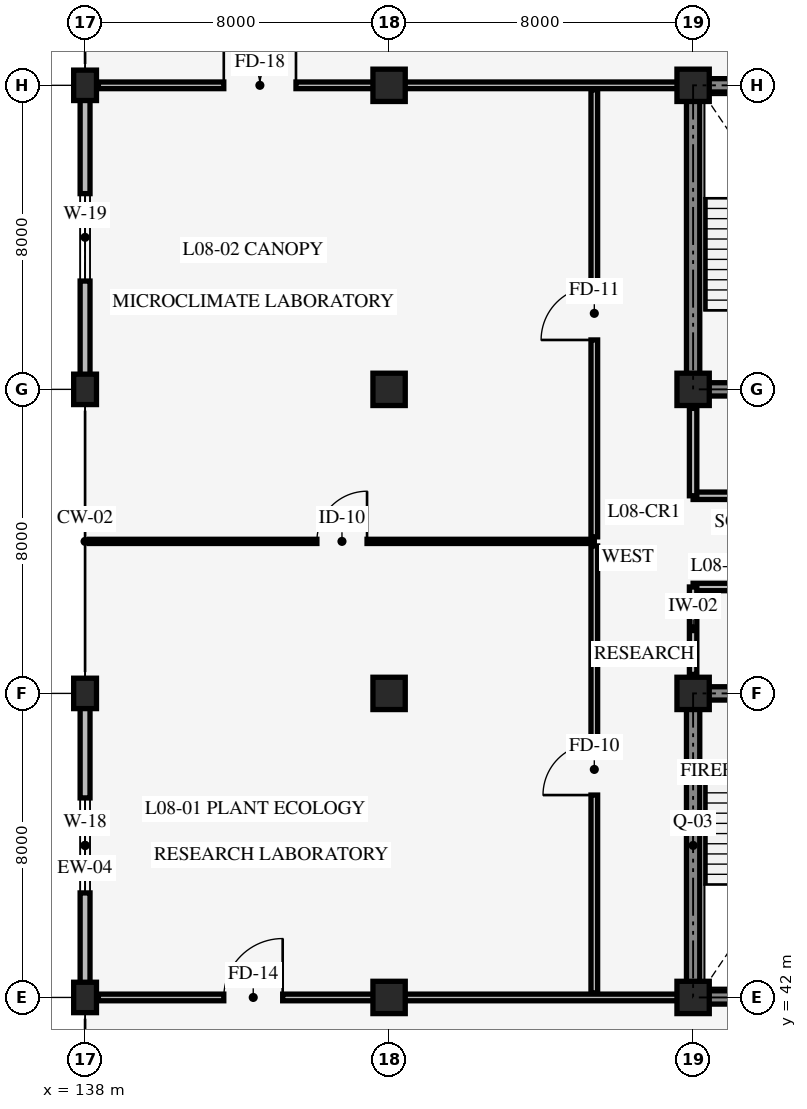
"""IFC4 building model, lengths in metres.
Left out: names, types, materials, properties, quantities, classifications, styles, units other than length and angle.
Written with IfcOpenShell. Run it as: python <this file> out.ifc"""

import sys

from ifc_helpers import new_model, si_unit, direction, frame, frame_2d, origin, origin_2d, place, context, subcontext, project, spatial, rectangle, extrude, element, fill, save


model = new_model("IFC4")
c1 = context("Model", 3, precision=1e-05, world=origin(), true_north=direction((0.0, 1.0)))
c2 = subcontext(c1, "Body", "Model", "MODEL_VIEW")
j1 = project(units=[si_unit("LENGTHUNIT", "METRE"), si_unit("PLANEANGLEUNIT", "RADIAN")], contexts=[c1])
p1 = place(None, origin())
s1 = spatial("IfcSite", under=j1, at=p1, CompositionType="ELEMENT")
p2 = place(p1, origin())
s2 = spatial("IfcBuilding", under=s1, at=p2, CompositionType="ELEMENT")
p3 = place(p2, frame((0.0, 0.0, 31.8)))
s3 = spatial("IfcBuildingStorey", under=s2, at=p3, CompositionType="ELEMENT", Elevation=31.8)
p4 = place(p3, frame((154.0, 42.0, 0.0), z_axis=(0.0, 0.0, 1.0), x_axis=(1.0, 0.0, 0.0)))
e1 = element("IfcWall", 1, at=p4, inside=s3, PredefinedType="SHEAR", context=c2, shape_type="SweptSolid", body=[
    extrude(rectangle(XDim=8.0, YDim=0.35, at=frame_2d((4.0, 0.0))), origin(), (0.0, 0.0, 1.0), 3.95),
])
p5 = place(p3, frame((162.0, 50.0, 0.0), z_axis=(0.0, 0.0, 1.0), x_axis=(-1.0, 0.0, 0.0)))
e2 = element("IfcWall", 2, at=p5, inside=s3, PredefinedType="SHEAR", context=c2, shape_type="SweptSolid", body=[
    extrude(rectangle(XDim=8.0, YDim=0.35, at=frame_2d((4.0, 0.0))), origin(), (0.0, 0.0, 1.0), 3.95),
])
p6 = place(p5, frame((5.3, 0.0, 0.0)))
e3 = element("IfcOpeningElement", 3, at=p6, cuts=e2, PredefinedType="OPENING", context=c2, shape_type="SweptSolid", body=[
    extrude(rectangle(XDim=1.3, YDim=2.15, at=frame_2d((0.65, 1.075))), frame((0.0, 0.185, 0.0), z_axis=(0.0, -1.0, 0.0), x_axis=(1.0, 0.0, 0.0)), (0.0, 0.0, 1.0), 0.37),
])
p7 = place(p5, frame((1.45, 0.0, 0.0)))
e4 = element("IfcOpeningElement", 4, at=p7, cuts=e2, PredefinedType="OPENING", context=c2, shape_type="SweptSolid", body=[
    extrude(rectangle(XDim=1.1, YDim=2.2, at=frame_2d((0.55, 1.1))), frame((0.0, 0.185, 0.0), z_axis=(0.0, -1.0, 0.0), x_axis=(1.0, 0.0, 0.0)), (0.0, 0.0, 1.0), 0.37),
])
p8 = place(p3, frame((154.0, 50.0, 0.0), z_axis=(0.0, 0.0, 1.0), x_axis=(0.0, -1.0, 0.0)))
e5 = element("IfcWall", 5, at=p8, inside=s3, PredefinedType="SHEAR", context=c2, shape_type="SweptSolid", body=[
    extrude(rectangle(XDim=8.0, YDim=0.35, at=frame_2d((4.0, 0.0))), origin(), (0.0, 0.0, 1.0), 3.95),
])
p9 = place(p3, frame((154.0, 58.0, 0.0), z_axis=(0.0, 0.0, 1.0), x_axis=(1.0, 0.0, 0.0)))
e6 = element("IfcWall", 6, at=p9, inside=s3, PredefinedType="SHEAR", context=c2, shape_type="SweptSolid", body=[
    extrude(rectangle(XDim=8.0, YDim=0.35, at=frame_2d((4.0, 0.0))), origin(), (0.0, 0.0, 1.0), 3.95),
])
p10 = place(p9, frame((1.4, 0.0, 0.0)))
e7 = element("IfcOpeningElement", 7, at=p10, cuts=e6, PredefinedType="OPENING", context=c2, shape_type="SweptSolid", body=[
    extrude(rectangle(XDim=1.3, YDim=2.15, at=frame_2d((0.65, 1.075))), frame((0.0, 0.185, 0.0), z_axis=(0.0, -1.0, 0.0), x_axis=(1.0, 0.0, 0.0)), (0.0, 0.0, 1.0), 0.37),
])
p11 = place(p9, frame((5.3, 0.0, 0.0)))
e8 = element("IfcOpeningElement", 8, at=p11, cuts=e6, PredefinedType="OPENING", context=c2, shape_type="SweptSolid", body=[
    extrude(rectangle(XDim=1.1, YDim=2.2, at=frame_2d((0.55, 1.1))), frame((0.0, 0.185, 0.0), z_axis=(0.0, -1.0, 0.0), x_axis=(1.0, 0.0, 0.0)), (0.0, 0.0, 1.0), 0.37),
])
for number, where, z_axis, x_axis in (
    (9, (162.0, 66.0, 0.0), (0.0, 0.0, 1.0), (-1.0, 0.0, 0.0)),
    (10, (154.0, 66.0, 0.0), (0.0, 0.0, 1.0), (0.0, -1.0, 0.0)),
):
    element("IfcWall", number, at=place(p3, frame(where, z_axis=z_axis, x_axis=x_axis)), inside=s3, PredefinedType="SHEAR", context=c2, shape_type="SweptSolid", body=[
        extrude(rectangle(XDim=8.0, YDim=0.35, at=frame_2d((4.0, 0.0))), origin(), (0.0, 0.0, 1.0), 3.95),
    ])
for number, where, z_axis, x_axis in (
    (11, (138.0, 42.0, 0.0), (0.0, 0.0, 1.0), (1.0, 0.0, 0.0)),
    (12, (138.0, 50.0, 0.0), (0.0, 0.0, 1.0), (1.0, 0.0, 0.0)),
    (13, (138.0, 58.0, 0.0), (0.0, 0.0, 1.0), (1.0, 0.0, 0.0)),
    (14, (138.0, 66.0, 0.0), (0.0, 0.0, 1.0), (1.0, 0.0, 0.0)),
):
    element("IfcColumn", number, at=place(p3, frame(where, z_axis=z_axis, x_axis=x_axis)), inside=s3, PredefinedType="COLUMN", context=c2, shape_type="SweptSolid", body=[
        extrude(rectangle(XDim=0.6, YDim=0.8, at=origin_2d()), origin(), (0.0, 0.0, 1.0), 4.2),
    ])
for number, where, z_axis, x_axis in (
    (15, (146.0, 42.0, 0.0), (0.0, 0.0, 1.0), (1.0, 0.0, 0.0)),
    (16, (146.0, 50.0, 0.0), (0.0, 0.0, 1.0), (1.0, 0.0, 0.0)),
    (17, (146.0, 58.0, 0.0), (0.0, 0.0, 1.0), (1.0, 0.0, 0.0)),
    (18, (146.0, 66.0, 0.0), (0.0, 0.0, 1.0), (1.0, 0.0, 0.0)),
    (19, (154.0, 42.0, 0.0), (0.0, 0.0, 1.0), (1.0, 0.0, 0.0)),
    (20, (154.0, 50.0, 0.0), (0.0, 0.0, 1.0), (1.0, 0.0, 0.0)),
    (21, (154.0, 58.0, 0.0), (0.0, 0.0, 1.0), (1.0, 0.0, 0.0)),
    (22, (154.0, 66.0, 0.0), (0.0, 0.0, 1.0), (1.0, 0.0, 0.0)),
):
    element("IfcColumn", number, at=place(p3, frame(where, z_axis=z_axis, x_axis=x_axis)), inside=s3, PredefinedType="COLUMN", context=c2, shape_type="SweptSolid", body=[
        extrude(rectangle(XDim=0.85, YDim=0.85, at=origin_2d()), origin(), (0.0, 0.0, 1.0), 4.2),
    ])
p12 = place(p3, frame((138.0, 42.0, 0.0), z_axis=(0.0, 0.0, 1.0), x_axis=(0.0, 1.0, 0.0)))
e23 = element("IfcWall", 23, at=p12, inside=s3, PredefinedType="STANDARD", context=c2, shape_type="SweptSolid", body=[
    extrude(rectangle(XDim=8.0, YDim=0.26, at=frame_2d((4.0, 0.0))), origin(), (0.0, 0.0, 1.0), 3.31),
])
p13 = place(p12, frame((2.75, 0.0, 0.85)))
e24 = element("IfcOpeningElement", 24, at=p13, cuts=e23, PredefinedType="OPENING", context=c2, shape_type="SweptSolid", body=[
    extrude(rectangle(XDim=2.5, YDim=1.8, at=frame_2d((1.25, 0.9))), frame((0.0, 0.14, 0.0), z_axis=(0.0, -1.0, 0.0), x_axis=(1.0, 0.0, 0.0)), (0.0, 0.0, 1.0), 0.28),
])
p14 = place(p3, frame((138.0, 58.0, 0.0), z_axis=(0.0, 0.0, 1.0), x_axis=(0.0, 1.0, 0.0)))
e25 = element("IfcWall", 25, at=p14, inside=s3, PredefinedType="STANDARD", context=c2, shape_type="SweptSolid", body=[
    extrude(rectangle(XDim=8.0, YDim=0.26, at=frame_2d((4.0, 0.0))), origin(), (0.0, 0.0, 1.0), 3.31),
])
p15 = place(p14, frame((2.85, 0.0, 0.85)))
e26 = element("IfcOpeningElement", 26, at=p15, cuts=e25, PredefinedType="OPENING", context=c2, shape_type="SweptSolid", body=[
    extrude(rectangle(XDim=2.3, YDim=1.5, at=frame_2d((1.15, 0.75))), frame((0.0, 0.14, 0.0), z_axis=(0.0, -1.0, 0.0), x_axis=(1.0, 0.0, 0.0)), (0.0, 0.0, 1.0), 0.28),
])
p16 = place(p3, frame((154.0, 52.8, 0.0), z_axis=(0.0, 0.0, 1.0), x_axis=(1.0, 0.0, 0.0)))
e27 = element("IfcWall", 27, at=p16, inside=s3, PredefinedType="STANDARD", context=c2, shape_type="SweptSolid", body=[
    extrude(rectangle(XDim=7.6, YDim=0.195, at=frame_2d((3.8, 0.0))), origin(), (0.0, 0.0, 1.0), 3.9),
])
p17 = place(p16, frame((2.8, 0.0, 0.0)))
e28 = element("IfcOpeningElement", 28, at=p17, cuts=e27, PredefinedType="OPENING", context=c2, shape_type="SweptSolid", body=[
    extrude(rectangle(XDim=1.3, YDim=2.15, at=frame_2d((0.65, 1.075))), frame((0.0, 0.107, 0.0), z_axis=(0.0, -1.0, 0.0), x_axis=(1.0, 0.0, 0.0)), (0.0, 0.0, 1.0), 0.215),
])
p18 = place(p3, frame((154.0, 50.5, 0.0), z_axis=(0.0, 0.0, 1.0), x_axis=(0.0, 1.0, 0.0)))
e29 = element("IfcWall", 29, at=p18, inside=s3, PredefinedType="STANDARD", context=c2, shape_type="SweptSolid", body=[
    extrude(rectangle(XDim=2.3, YDim=0.195, at=frame_2d((1.15, 0.0))), origin(), (0.0, 0.0, 1.0), 3.31),
])
p19 = place(p3, frame((154.0, 55.2, 0.0), z_axis=(0.0, 0.0, 1.0), x_axis=(1.0, 0.0, 0.0)))
e30 = element("IfcWall", 30, at=p19, inside=s3, PredefinedType="STANDARD", context=c2, shape_type="SweptSolid", body=[
    extrude(rectangle(XDim=7.6, YDim=0.195, at=frame_2d((3.8, 0.0))), origin(), (0.0, 0.0, 1.0), 3.9),
])
p20 = place(p19, frame((2.8, 0.0, 0.0)))
e31 = element("IfcOpeningElement", 31, at=p20, cuts=e30, PredefinedType="OPENING", context=c2, shape_type="SweptSolid", body=[
    extrude(rectangle(XDim=1.4, YDim=2.2, at=frame_2d((0.7, 1.1))), frame((0.0, 0.107, 0.0), z_axis=(0.0, -1.0, 0.0), x_axis=(1.0, 0.0, 0.0)), (0.0, 0.0, 1.0), 0.215),
])
p21 = place(p3, frame((154.0, 55.2, 0.0), z_axis=(0.0, 0.0, 1.0), x_axis=(0.0, 1.0, 0.0)))
e32 = element("IfcWall", 32, at=p21, inside=s3, PredefinedType="STANDARD", context=c2, shape_type="SweptSolid", body=[
    extrude(rectangle(XDim=2.3, YDim=0.195, at=frame_2d((1.15, 0.0))), origin(), (0.0, 0.0, 1.0), 3.31),
])
p22 = place(p3, frame((151.4, 42.12, 0.0), z_axis=(0.0, 0.0, 1.0), x_axis=(0.0, 1.0, 0.0)))
e33 = element("IfcWall", 33, at=p22, inside=s3, PredefinedType="STANDARD", context=c2, shape_type="SweptSolid", body=[
    extrude(rectangle(XDim=11.76, YDim=0.175, at=frame_2d((5.88, 0.0))), origin(), (0.0, 0.0, 1.0), 3.9),
])
p23 = place(p22, frame((5.205, 0.0, 0.0)))
e34 = element("IfcOpeningElement", 34, at=p23, cuts=e33, PredefinedType="OPENING", context=c2, shape_type="SweptSolid", body=[
    extrude(rectangle(XDim=1.35, YDim=2.15, at=frame_2d((0.675, 1.075))), frame((0.0, 0.098, 0.0), z_axis=(0.0, -1.0, 0.0), x_axis=(1.0, 0.0, 0.0)), (0.0, 0.0, 1.0), 0.195),
])
p24 = place(p3, frame((138.12, 54.0, 0.0), z_axis=(0.0, 0.0, 1.0), x_axis=(1.0, 0.0, 0.0)))
e35 = element("IfcWall", 35, at=p24, inside=s3, PredefinedType="STANDARD", context=c2, shape_type="SweptSolid", body=[
    extrude(rectangle(XDim=13.28, YDim=0.11, at=frame_2d((6.64, 0.0))), origin(), (0.0, 0.0, 1.0), 3.9),
])
p25 = place(p24, frame((5.98, 0.0, 0.0)))
e36 = element("IfcOpeningElement", 36, at=p25, cuts=e35, PredefinedType="OPENING", context=c2, shape_type="SweptSolid", body=[
    extrude(rectangle(XDim=1.32, YDim=2.16, at=frame_2d((0.66, 1.08))), frame((0.0, 0.065, 0.0), z_axis=(0.0, -1.0, 0.0), x_axis=(1.0, 0.0, 0.0)), (0.0, 0.0, 1.0), 0.13),
])
p26 = place(p3, frame((151.4, 54.12, 0.0), z_axis=(0.0, 0.0, 1.0), x_axis=(0.0, 1.0, 0.0)))
e37 = element("IfcWall", 37, at=p26, inside=s3, PredefinedType="STANDARD", context=c2, shape_type="SweptSolid", body=[
    extrude(rectangle(XDim=11.76, YDim=0.175, at=frame_2d((5.88, 0.0))), origin(), (0.0, 0.0, 1.0), 3.9),
])
p27 = place(p26, frame((5.18, 0.0, 0.0)))
e38 = element("IfcOpeningElement", 38, at=p27, cuts=e37, PredefinedType="OPENING", context=c2, shape_type="SweptSolid", body=[
    extrude(rectangle(XDim=1.4, YDim=2.2, at=frame_2d((0.7, 1.1))), frame((0.0, 0.098, 0.0), z_axis=(0.0, -1.0, 0.0), x_axis=(1.0, 0.0, 0.0)), (0.0, 0.0, 1.0), 0.195),
])
p28 = place(p3, frame((138.35, 42.0, 0.0), z_axis=(0.0, 0.0, 1.0), x_axis=(1.0, 0.0, 0.0)))
e39 = element("IfcWall", 39, at=p28, inside=s3, PredefinedType="STANDARD", context=c2, shape_type="SweptSolid", body=[
    extrude(rectangle(XDim=15.3, YDim=0.175, at=frame_2d((7.65, 0.0))), origin(), (0.0, 0.0, 1.0), 3.26),
])
p29 = place(p28, frame((3.3, 0.0, 0.0)))
e40 = element("IfcOpeningElement", 40, at=p29, cuts=e39, PredefinedType="OPENING", context=c2, shape_type="SweptSolid", body=[
    extrude(rectangle(XDim=1.55, YDim=2.25, at=frame_2d((0.775, 1.125))), frame((0.0, 0.098, 0.0), z_axis=(0.0, -1.0, 0.0), x_axis=(1.0, 0.0, 0.0)), (0.0, 0.0, 1.0), 0.195),
])
p30 = place(p3, frame((138.35, 66.0, 0.0), z_axis=(0.0, 0.0, 1.0), x_axis=(1.0, 0.0, 0.0)))
e41 = element("IfcWall", 41, at=p30, inside=s3, PredefinedType="STANDARD", context=c2, shape_type="SweptSolid", body=[
    extrude(rectangle(XDim=15.3, YDim=0.175, at=frame_2d((7.65, 0.0))), origin(), (0.0, 0.0, 1.0), 3.26),
])
p31 = place(p30, frame((3.3, 0.0, 0.0)))
e42 = element("IfcOpeningElement", 42, at=p31, cuts=e41, PredefinedType="OPENING", context=c2, shape_type="SweptSolid", body=[
    extrude(rectangle(XDim=1.9, YDim=2.35, at=frame_2d((0.95, 1.175))), frame((0.0, 0.098, 0.0), z_axis=(0.0, -1.0, 0.0), x_axis=(1.0, 0.0, 0.0)), (0.0, 0.0, 1.0), 0.195),
])
p32 = place(p13, origin())
e43 = element("IfcWindow", 43, at=p32, inside=s3, PartitioningType="SINGLE_PANEL", PredefinedType="WINDOW", context=c2, shape_type="SweptSolid", body=[
    extrude(rectangle(XDim=2.5, YDim=1.8, at=frame_2d((1.25, 0.9))), frame((0.0, 0.03, 0.0), z_axis=(0.0, -1.0, 0.0), x_axis=(1.0, 0.0, 0.0)), (0.0, 0.0, 1.0), 0.06),
])
fill(e24, e43)
p33 = place(p15, origin())
e44 = element("IfcWindow", 44, at=p33, inside=s3, PartitioningType="SINGLE_PANEL", PredefinedType="WINDOW", context=c2, shape_type="SweptSolid", body=[
    extrude(rectangle(XDim=2.3, YDim=1.5, at=frame_2d((1.15, 0.75))), frame((0.0, 0.03, 0.0), z_axis=(0.0, -1.0, 0.0), x_axis=(1.0, 0.0, 0.0)), (0.0, 0.0, 1.0), 0.06),
])
fill(e26, e44)
p34 = place(p23, origin())
e45 = element("IfcDoor", 45, at=p34, inside=s3, OperationType="SINGLE_SWING_LEFT", PredefinedType="DOOR", context=c2, shape_type="SweptSolid", body=[
    extrude(rectangle(XDim=1.35, YDim=2.15, at=frame_2d((0.675, 1.075))), frame((0.0, 0.025, 0.0), z_axis=(0.0, -1.0, 0.0), x_axis=(1.0, 0.0, 0.0)), (0.0, 0.0, 1.0), 0.05),
])
fill(e34, e45)
p35 = place(p25, origin())
e46 = element("IfcDoor", 46, at=p35, inside=s3, OperationType="SINGLE_SWING_RIGHT", PredefinedType="DOOR", context=c2, shape_type="SweptSolid", body=[
    extrude(rectangle(XDim=1.32, YDim=2.16, at=frame_2d((0.66, 1.08))), frame((0.0, 0.025, 0.0), z_axis=(0.0, -1.0, 0.0), x_axis=(1.0, 0.0, 0.0)), (0.0, 0.0, 1.0), 0.05),
])
fill(e36, e46)
p36 = place(p27, origin())
e47 = element("IfcDoor", 47, at=p36, inside=s3, OperationType="SINGLE_SWING_LEFT", PredefinedType="DOOR", context=c2, shape_type="SweptSolid", body=[
    extrude(rectangle(XDim=1.4, YDim=2.2, at=frame_2d((0.7, 1.1))), frame((0.0, 0.025, 0.0), z_axis=(0.0, -1.0, 0.0), x_axis=(1.0, 0.0, 0.0)), (0.0, 0.0, 1.0), 0.05),
])
fill(e38, e47)
p37 = place(p29, origin())
e48 = element("IfcDoor", 48, at=p37, inside=s3, OperationType="SINGLE_SWING_RIGHT", PredefinedType="DOOR", context=c2, shape_type="SweptSolid", body=[
    extrude(rectangle(XDim=1.55, YDim=2.25, at=frame_2d((0.775, 1.125))), frame((0.0, 0.025, 0.0), z_axis=(0.0, -1.0, 0.0), x_axis=(1.0, 0.0, 0.0)), (0.0, 0.0, 1.0), 0.05),
])
fill(e40, e48)
p38 = place(p31, origin())
e49 = element("IfcDoor", 49, at=p38, inside=s3, OperationType="DOUBLE_DOOR_SINGLE_SWING", PredefinedType="DOOR", context=c2, shape_type="SweptSolid", body=[
    extrude(rectangle(XDim=1.9, YDim=2.35, at=frame_2d((0.95, 1.175))), frame((0.0, 0.025, 0.0), z_axis=(0.0, -1.0, 0.0), x_axis=(1.0, 0.0, 0.0)), (0.0, 0.0, 1.0), 0.05),
])
fill(e42, e49)
save(model, sys.argv[1])
